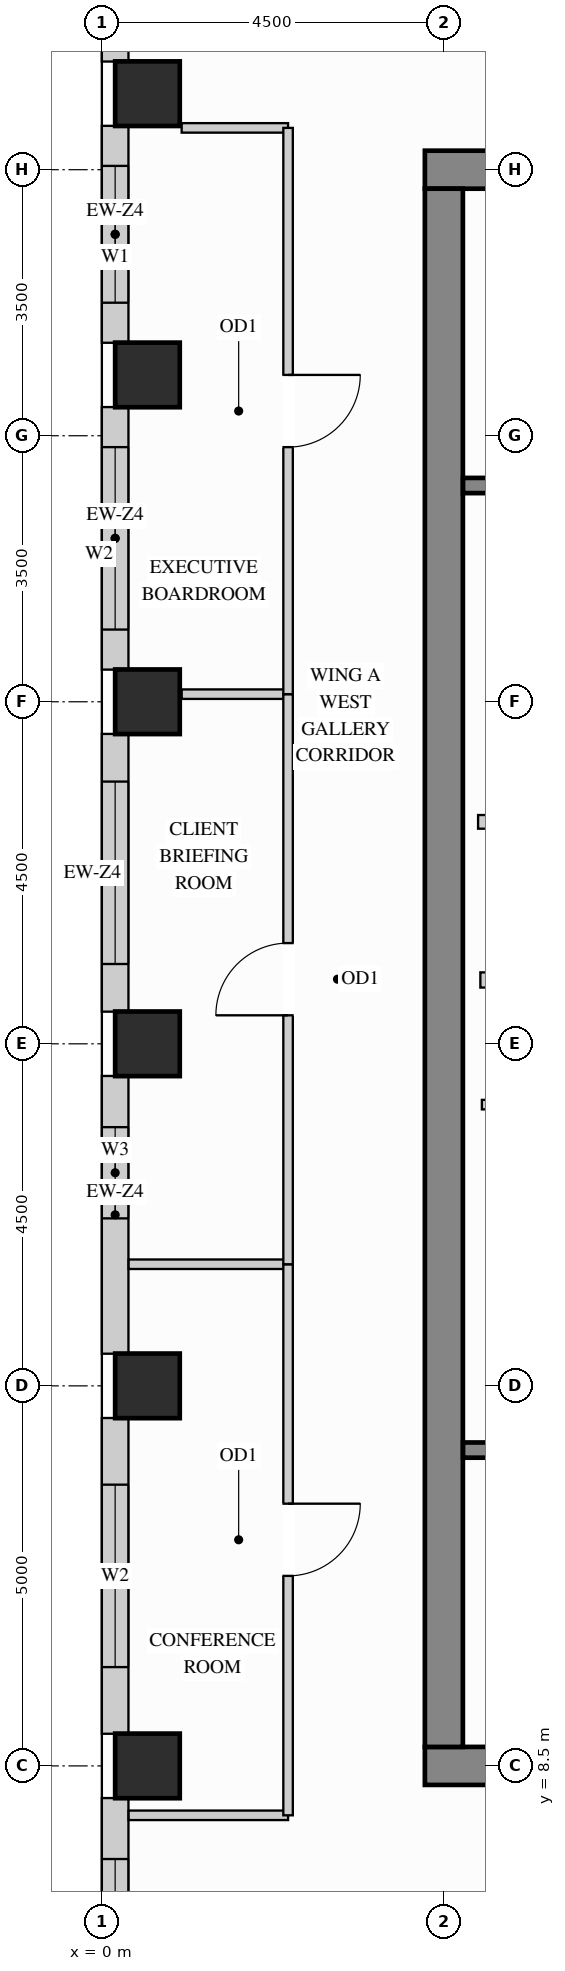
"""IFC4 building model, lengths in metres.
Left out: names, types, materials, properties, quantities, classifications, styles, units other than length and angle.
Written with IfcOpenShell. Run it as: python <this file> out.ifc"""

import sys

from ifc_helpers import new_model, si_unit, direction, frame, frame_2d, origin, origin_2d, place, context, subcontext, project, spatial, rectangle, extrude, source, transform, mapped, element, fill, save


model = new_model("IFC4")
c1 = context("Model", 3, precision=1e-05, world=origin(), true_north=direction((0.0, 1.0)))
c2 = subcontext(c1, "Body", "Model", "MODEL_VIEW")
j1 = project(units=[si_unit("LENGTHUNIT", "METRE"), si_unit("PLANEANGLEUNIT", "RADIAN")], contexts=[c1])
p1 = place(None, origin())
s1 = spatial("IfcSite", under=j1, at=p1, CompositionType="ELEMENT")
p2 = place(p1, origin())
s2 = spatial("IfcBuilding", under=s1, at=p2, CompositionType="ELEMENT")
p3 = place(p2, frame((0.0, 0.0, 216.0)))
s3 = spatial("IfcBuildingStorey", under=s2, at=p3, CompositionType="ELEMENT", Elevation=216.0)
m1 = source(origin(), c2, "Body", "SweptSolid", [
    extrude(rectangle(XDim=0.85, YDim=0.85, at=origin_2d()), origin(), (0.0, 0.0, 1.0), 3.4),
])
for number, where, z_axis, x_axis in (
    (1, (0.6, 13.5, 0.0), (0.0, 0.0, 1.0), (1.0, 0.0, 0.0)),
    (2, (0.6, 18.0, 0.0), (0.0, 0.0, 1.0), (1.0, 0.0, 0.0)),
    (3, (0.6, 22.5, 0.0), (0.0, 0.0, 1.0), (1.0, 0.0, 0.0)),
    (4, (0.6, 26.8, 0.0), (0.0, 0.0, 1.0), (1.0, 0.0, 0.0)),
    (5, (0.6, 30.5, 0.0), (0.0, 0.0, 1.0), (1.0, 0.0, 0.0)),
    (6, (0.6, 8.5, 0.0), (0.0, 0.0, 1.0), (1.0, 0.0, 0.0)),
):
    element("IfcColumn", number, at=place(p3, frame(where, z_axis=z_axis, x_axis=x_axis)), inside=s3, PredefinedType="COLUMN", context=c2, shape_type="MappedRepresentation", body=[
        mapped(m1, transform((0.0, 0.0, 0.0), x_axis=(1.0, 0.0, 0.0), y_axis=(0.0, 1.0, 0.0), z_axis=(0.0, 0.0, 1.0))),
    ])
m2 = source(origin(), c2, "Body", "SweptSolid", [
    extrude(rectangle(XDim=10.5, YDim=0.5, at=frame_2d((5.25, 0.0))), origin(), (0.0, 0.0, 1.0), 3.4),
])
for number, where, z_axis, x_axis in (
    (7, (4.25, 29.5, 0.0), (0.0, 0.0, 1.0), (1.0, 0.0, 0.0)),
    (8, (4.25, 8.5, 0.0), (0.0, 0.0, 1.0), (1.0, 0.0, 0.0)),
):
    element("IfcWall", number, at=place(p3, frame(where, z_axis=z_axis, x_axis=x_axis)), inside=s3, PredefinedType="SHEAR", context=c2, shape_type="MappedRepresentation", body=[
        mapped(m2, transform((0.0, 0.0, 0.0), x_axis=(1.0, 0.0, 0.0), y_axis=(0.0, 1.0, 0.0), z_axis=(0.0, 0.0, 1.0))),
    ])
m3 = source(origin(), c2, "Body", "SweptSolid", [
    extrude(rectangle(XDim=20.5, YDim=0.5, at=frame_2d((10.25, 0.0))), origin(), (0.0, 0.0, 1.0), 3.4),
])
p4 = place(p3, frame((4.5, 8.75, 0.0), z_axis=(0.0, 0.0, 1.0), x_axis=(0.0, 1.0, 0.0)))
e9 = element("IfcWall", 9, at=p4, inside=s3, PredefinedType="SHEAR", context=c2, shape_type="MappedRepresentation", body=[
    mapped(m3, transform((0.0, 0.0, 0.0), x_axis=(1.0, 0.0, 0.0), y_axis=(0.0, 1.0, 0.0), z_axis=(0.0, 0.0, 1.0))),
])
p5 = place(p3, frame((0.175, 34.577, 0.0), z_axis=(0.0, 0.0, 1.0), x_axis=(0.0, -1.0, 0.0)))
e10 = element("IfcWall", 10, at=p5, inside=s3, PredefinedType="SOLIDWALL", context=c2, shape_type="SweptSolid", body=[
    extrude(rectangle(XDim=3.654, YDim=0.35, at=frame_2d((1.827, 0.0))), origin(), (0.0, 0.0, 1.0), 3.385),
])
p6 = place(p5, frame((0.598, 0.0, 0.78)))
e11 = element("IfcOpeningElement", 11, at=p6, cuts=e10, PredefinedType="OPENING", context=c2, shape_type="SweptSolid", body=[
    extrude(rectangle(XDim=1.2, YDim=2.1, at=frame_2d((0.6, 1.05))), frame((0.0, 0.185, 0.0), z_axis=(0.0, -1.0, 0.0), x_axis=(1.0, 0.0, 0.0)), (0.0, 0.0, 1.0), 0.37),
])
p7 = place(p3, frame((0.175, 30.077, 0.0), z_axis=(0.0, 0.0, 1.0), x_axis=(0.0, -1.0, 0.0)))
e12 = element("IfcWall", 12, at=p7, inside=s3, PredefinedType="SOLIDWALL", context=c2, shape_type="SweptSolid", body=[
    extrude(rectangle(XDim=2.854, YDim=0.35, at=frame_2d((1.427, 0.0))), origin(), (0.0, 0.0, 1.0), 3.385),
])
p8 = place(p7, frame((0.527, 0.0, 0.78)))
e13 = element("IfcOpeningElement", 13, at=p8, cuts=e12, PredefinedType="OPENING", context=c2, shape_type="SweptSolid", body=[
    extrude(rectangle(XDim=1.8, YDim=2.1, at=frame_2d((0.9, 1.05))), frame((0.0, 0.185, 0.0), z_axis=(0.0, -1.0, 0.0), x_axis=(1.0, 0.0, 0.0)), (0.0, 0.0, 1.0), 0.37),
])
p9 = place(p3, frame((0.175, 26.377, 0.0), z_axis=(0.0, 0.0, 1.0), x_axis=(0.0, -1.0, 0.0)))
e14 = element("IfcWall", 14, at=p9, inside=s3, PredefinedType="SOLIDWALL", context=c2, shape_type="SweptSolid", body=[
    extrude(rectangle(XDim=3.454, YDim=0.35, at=frame_2d((1.727, 0.0))), origin(), (0.0, 0.0, 1.0), 3.385),
])
p10 = place(p9, frame((0.527, 0.0, 0.78)))
e15 = element("IfcOpeningElement", 15, at=p10, cuts=e14, PredefinedType="OPENING", context=c2, shape_type="SweptSolid", body=[
    extrude(rectangle(XDim=2.4, YDim=2.1, at=frame_2d((1.2, 1.05))), frame((0.0, 0.185, 0.0), z_axis=(0.0, -1.0, 0.0), x_axis=(1.0, 0.0, 0.0)), (0.0, 0.0, 1.0), 0.37),
])
p11 = place(p3, frame((0.175, 22.077, 0.0), z_axis=(0.0, 0.0, 1.0), x_axis=(0.0, -1.0, 0.0)))
e16 = element("IfcWall", 16, at=p11, inside=s3, PredefinedType="SOLIDWALL", context=c2, shape_type="SweptSolid", body=[
    extrude(rectangle(XDim=3.654, YDim=0.35, at=frame_2d((1.827, 0.0))), origin(), (0.0, 0.0, 1.0), 3.385),
])
p12 = place(p11, frame((0.627, 0.0, 0.78)))
e17 = element("IfcOpeningElement", 17, at=p12, cuts=e16, PredefinedType="OPENING", context=c2, shape_type="SweptSolid", body=[
    extrude(rectangle(XDim=2.4, YDim=2.1, at=frame_2d((1.2, 1.05))), frame((0.0, 0.185, 0.0), z_axis=(0.0, -1.0, 0.0), x_axis=(1.0, 0.0, 0.0)), (0.0, 0.0, 1.0), 0.37),
])
p13 = place(p3, frame((0.175, 17.577, 0.0), z_axis=(0.0, 0.0, 1.0), x_axis=(0.0, -1.0, 0.0)))
e18 = element("IfcWall", 18, at=p13, inside=s3, PredefinedType="SOLIDWALL", context=c2, shape_type="SweptSolid", body=[
    extrude(rectangle(XDim=3.654, YDim=0.35, at=frame_2d((1.827, 0.0))), origin(), (0.0, 0.0, 1.0), 3.385),
])
p14 = place(p13, frame((0.674, 0.0, 0.78)))
e19 = element("IfcOpeningElement", 19, at=p14, cuts=e18, PredefinedType="OPENING", context=c2, shape_type="SweptSolid", body=[
    extrude(rectangle(XDim=1.2, YDim=2.1, at=frame_2d((0.6, 1.05))), frame((0.0, 0.185, 0.0), z_axis=(0.0, -1.0, 0.0), x_axis=(1.0, 0.0, 0.0)), (0.0, 0.0, 1.0), 0.37),
])
p15 = place(p3, frame((0.175, 13.077, 0.0), z_axis=(0.0, 0.0, 1.0), x_axis=(0.0, -1.0, 0.0)))
e20 = element("IfcWall", 20, at=p15, inside=s3, PredefinedType="SOLIDWALL", context=c2, shape_type="SweptSolid", body=[
    extrude(rectangle(XDim=4.154, YDim=0.35, at=frame_2d((2.077, 0.0))), origin(), (0.0, 0.0, 1.0), 3.385),
])
p16 = place(p15, frame((0.877, 0.0, 0.78)))
e21 = element("IfcOpeningElement", 21, at=p16, cuts=e20, PredefinedType="OPENING", context=c2, shape_type="SweptSolid", body=[
    extrude(rectangle(XDim=2.4, YDim=2.1, at=frame_2d((1.2, 1.05))), frame((0.0, 0.185, 0.0), z_axis=(0.0, -1.0, 0.0), x_axis=(1.0, 0.0, 0.0)), (0.0, 0.0, 1.0), 0.37),
])
p17 = place(p3, frame((0.175, 8.077, 0.0), z_axis=(0.0, 0.0, 1.0), x_axis=(0.0, -1.0, 0.0)))
e22 = element("IfcWall", 22, at=p17, inside=s3, PredefinedType="SOLIDWALL", context=c2, shape_type="SweptSolid", body=[
    extrude(rectangle(XDim=4.154, YDim=0.35, at=frame_2d((2.077, 0.0))), origin(), (0.0, 0.0, 1.0), 3.385),
])
p18 = place(p17, frame((0.802, 0.0, 0.78)))
e23 = element("IfcOpeningElement", 23, at=p18, cuts=e22, PredefinedType="OPENING", context=c2, shape_type="SweptSolid", body=[
    extrude(rectangle(XDim=1.2, YDim=2.1, at=frame_2d((0.6, 1.05))), frame((0.0, 0.185, 0.0), z_axis=(0.0, -1.0, 0.0), x_axis=(1.0, 0.0, 0.0)), (0.0, 0.0, 1.0), 0.37),
])
m4 = source(origin(), c2, "Body", "SweptSolid", [
    extrude(rectangle(XDim=2.2, YDim=0.18, at=frame_2d((1.1, 0.0))), origin(), (0.0, 0.0, 1.0), 3.385),
])
p19 = place(p3, frame((4.95, 20.92, 0.0), z_axis=(0.0, 0.0, 1.0), x_axis=(1.0, 0.0, 0.0)))
e24 = element("IfcWall", 24, at=p19, inside=s3, PredefinedType="PARTITIONING", context=c2, shape_type="MappedRepresentation", body=[
    mapped(m4, transform((0.0, 0.0, 0.0), x_axis=(1.0, 0.0, 0.0), y_axis=(0.0, 1.0, 0.0), z_axis=(0.0, 0.0, 1.0))),
])
p20 = place(p3, frame((5.0, 17.2, 0.0), z_axis=(0.0, 0.0, 1.0), x_axis=(1.0, 0.0, 0.0)))
e25 = element("IfcWall", 25, at=p20, inside=s3, PredefinedType="PARTITIONING", context=c2, shape_type="SweptSolid", body=[
    extrude(rectangle(XDim=2.4, YDim=0.125, at=frame_2d((1.2, 0.0))), origin(), (0.0, 0.0, 1.0), 3.385),
])
p21 = place(p20, frame((0.7, 0.0, 0.0)))
e26 = element("IfcOpeningElement", 26, at=p21, cuts=e25, PredefinedType="OPENING", context=c2, shape_type="SweptSolid", body=[
    extrude(rectangle(XDim=0.85, YDim=2.1, at=frame_2d((0.425, 1.05))), frame((0.0, 0.073, 0.0), z_axis=(0.0, -1.0, 0.0), x_axis=(1.0, 0.0, 0.0)), (0.0, 0.0, 1.0), 0.145),
])
m5 = source(origin(), c2, "Body", "SweptSolid", [
    extrude(rectangle(XDim=1.4, YDim=0.125, at=frame_2d((0.7, 0.0))), origin(), (0.0, 0.0, 1.0), 3.385),
])
p22 = place(p3, frame((1.05, 30.05, 0.0), z_axis=(0.0, 0.0, 1.0), x_axis=(1.0, 0.0, 0.0)))
e27 = element("IfcWall", 27, at=p22, inside=s3, PredefinedType="PARTITIONING", context=c2, shape_type="MappedRepresentation", body=[
    mapped(m5, transform((0.0, 0.0, 0.0), x_axis=(1.0, 0.0, 0.0), y_axis=(0.0, 1.0, 0.0), z_axis=(0.0, 0.0, 1.0))),
])
m6 = source(origin(), c2, "Body", "SweptSolid", [
    extrude(rectangle(XDim=2.098, YDim=0.125, at=frame_2d((1.049, 0.0))), origin(), (0.0, 0.0, 1.0), 3.385),
])
for number, where, z_axis, x_axis in (
    (28, (0.352, 7.85, 0.0), (0.0, 0.0, 1.0), (1.0, 0.0, 0.0)),
    (29, (0.352, 15.1, 0.0), (0.0, 0.0, 1.0), (1.0, 0.0, 0.0)),
):
    element("IfcWall", number, at=place(p3, frame(where, z_axis=z_axis, x_axis=x_axis)), inside=s3, PredefinedType="PARTITIONING", context=c2, shape_type="MappedRepresentation", body=[
        mapped(m6, transform((0.0, 0.0, 0.0), x_axis=(1.0, 0.0, 0.0), y_axis=(0.0, 1.0, 0.0), z_axis=(0.0, 0.0, 1.0))),
    ])
p23 = place(p3, frame((1.05, 22.6, 0.0), z_axis=(0.0, 0.0, 1.0), x_axis=(1.0, 0.0, 0.0)))
e30 = element("IfcWall", 30, at=p23, inside=s3, PredefinedType="PARTITIONING", context=c2, shape_type="MappedRepresentation", body=[
    mapped(m5, transform((0.0, 0.0, 0.0), x_axis=(1.0, 0.0, 0.0), y_axis=(0.0, 1.0, 0.0), z_axis=(0.0, 0.0, 1.0))),
])
p24 = place(p3, frame((2.45, 7.85, 0.0), z_axis=(0.0, 0.0, 1.0), x_axis=(0.0, 1.0, 0.0)))
e31 = element("IfcWall", 31, at=p24, inside=s3, PredefinedType="PARTITIONING", context=c2, shape_type="SweptSolid", body=[
    extrude(rectangle(XDim=7.25, YDim=0.125, at=frame_2d((3.625, 0.0))), origin(), (0.0, 0.0, 1.0), 3.385),
])
p25 = place(p24, frame((3.15, 0.0, 0.0)))
e32 = element("IfcOpeningElement", 32, at=p25, cuts=e31, PredefinedType="OPENING", context=c2, shape_type="SweptSolid", body=[
    extrude(rectangle(XDim=0.95, YDim=2.15, at=frame_2d((0.475, 1.075))), frame((0.0, 0.073, 0.0), z_axis=(0.0, -1.0, 0.0), x_axis=(1.0, 0.0, 0.0)), (0.0, 0.0, 1.0), 0.145),
])
p26 = place(p3, frame((2.45, 15.1, 0.0), z_axis=(0.0, 0.0, 1.0), x_axis=(0.0, 1.0, 0.0)))
e33 = element("IfcWall", 33, at=p26, inside=s3, PredefinedType="PARTITIONING", context=c2, shape_type="SweptSolid", body=[
    extrude(rectangle(XDim=7.5, YDim=0.125, at=frame_2d((3.75, 0.0))), origin(), (0.0, 0.0, 1.0), 3.385),
])
p27 = place(p26, frame((3.275, 0.0, 0.0)))
e34 = element("IfcOpeningElement", 34, at=p27, cuts=e33, PredefinedType="OPENING", context=c2, shape_type="SweptSolid", body=[
    extrude(rectangle(XDim=0.95, YDim=2.15, at=frame_2d((0.475, 1.075))), frame((0.0, 0.073, 0.0), z_axis=(0.0, -1.0, 0.0), x_axis=(1.0, 0.0, 0.0)), (0.0, 0.0, 1.0), 0.145),
])
p28 = place(p3, frame((2.45, 22.6, 0.0), z_axis=(0.0, 0.0, 1.0), x_axis=(0.0, 1.0, 0.0)))
e35 = element("IfcWall", 35, at=p28, inside=s3, PredefinedType="PARTITIONING", context=c2, shape_type="SweptSolid", body=[
    extrude(rectangle(XDim=7.45, YDim=0.125, at=frame_2d((3.725, 0.0))), origin(), (0.0, 0.0, 1.0), 3.385),
])
p29 = place(p28, frame((3.25, 0.0, 0.0)))
e36 = element("IfcOpeningElement", 36, at=p29, cuts=e35, PredefinedType="OPENING", context=c2, shape_type="SweptSolid", body=[
    extrude(rectangle(XDim=0.95, YDim=2.15, at=frame_2d((0.475, 1.075))), frame((0.0, 0.073, 0.0), z_axis=(0.0, -1.0, 0.0), x_axis=(1.0, 0.0, 0.0)), (0.0, 0.0, 1.0), 0.145),
])
m7 = source(origin(), c2, "Body", "SweptSolid", [
    extrude(rectangle(XDim=2.09, YDim=0.2, at=frame_2d((1.045, 0.0))), origin(), (0.0, 0.0, 1.0), 3.385),
])
p30 = place(p3, frame((4.98, 18.84, 0.0), z_axis=(0.0, 0.0, 1.0), x_axis=(1.0, 0.0, 0.0)))
e37 = element("IfcWall", 37, at=p30, inside=s3, PredefinedType="PARTITIONING", context=c2, shape_type="MappedRepresentation", body=[
    mapped(m7, transform((0.0, 0.0, 0.0), x_axis=(1.0, 0.0, 0.0), y_axis=(0.0, 1.0, 0.0), z_axis=(0.0, 0.0, 1.0))),
])
p31 = place(p3, frame((4.752, 12.655, 0.0), z_axis=(0.0, 0.0, 1.0), x_axis=(1.0, 0.0, 0.0)))
e38 = element("IfcWall", 38, at=p31, inside=s3, PredefinedType="SHEAR", context=c2, shape_type="SweptSolid", body=[
    extrude(rectangle(XDim=7.653, YDim=0.2, at=frame_2d((3.827, 0.0))), origin(), (0.0, 0.0, 1.0), 3.4),
])
p32 = place(p31, frame((0.4, 0.0, 0.0)))
e39 = element("IfcOpeningElement", 39, at=p32, cuts=e38, PredefinedType="OPENING", context=c2, shape_type="SweptSolid", body=[
    extrude(rectangle(XDim=1.1, YDim=2.15, at=frame_2d((0.55, 1.075))), frame((0.0, 0.11, 0.0), z_axis=(0.0, -1.0, 0.0), x_axis=(1.0, 0.0, 0.0)), (0.0, 0.0, 1.0), 0.22),
])
p33 = place(p3, frame((4.752, 25.345, 0.0), z_axis=(0.0, 0.0, 1.0), x_axis=(1.0, 0.0, 0.0)))
e40 = element("IfcWall", 40, at=p33, inside=s3, PredefinedType="SHEAR", context=c2, shape_type="SweptSolid", body=[
    extrude(rectangle(XDim=7.653, YDim=0.2, at=frame_2d((3.827, 0.0))), origin(), (0.0, 0.0, 1.0), 3.4),
])
p34 = place(p33, frame((0.4, 0.0, 0.0)))
e41 = element("IfcOpeningElement", 41, at=p34, cuts=e40, PredefinedType="OPENING", context=c2, shape_type="SweptSolid", body=[
    extrude(rectangle(XDim=1.1, YDim=2.15, at=frame_2d((0.55, 1.075))), frame((0.0, 0.11, 0.0), z_axis=(0.0, -1.0, 0.0), x_axis=(1.0, 0.0, 0.0)), (0.0, 0.0, 1.0), 0.22),
])
m8 = source(origin(), c2, "Body", "SweptSolid", [
    extrude(rectangle(XDim=0.95, YDim=2.15, at=frame_2d((0.475, 1.075))), frame((0.0, 0.025, 0.0), z_axis=(0.0, -1.0, 0.0), x_axis=(1.0, 0.0, 0.0)), (0.0, 0.0, 1.0), 0.05),
])
p35 = place(p25, origin())
e42 = element("IfcDoor", 42, at=p35, inside=s3, OperationType="SINGLE_SWING_RIGHT", PredefinedType="DOOR", context=c2, shape_type="MappedRepresentation", body=[
    mapped(m8, transform((0.0, 0.0, 0.0), x_axis=(1.0, 0.0, 0.0), y_axis=(0.0, 1.0, 0.0), z_axis=(0.0, 0.0, 1.0))),
])
fill(e32, e42)
p36 = place(p27, origin())
e43 = element("IfcDoor", 43, at=p36, inside=s3, OperationType="SINGLE_SWING_LEFT", PredefinedType="DOOR", context=c2, shape_type="MappedRepresentation", body=[
    mapped(m8, transform((0.0, 0.0, 0.0), x_axis=(1.0, 0.0, 0.0), y_axis=(0.0, 1.0, 0.0), z_axis=(0.0, 0.0, 1.0))),
])
fill(e34, e43)
p37 = place(p29, origin())
e44 = element("IfcDoor", 44, at=p37, inside=s3, OperationType="SINGLE_SWING_RIGHT", PredefinedType="DOOR", context=c2, shape_type="MappedRepresentation", body=[
    mapped(m8, transform((0.0, 0.0, 0.0), x_axis=(1.0, 0.0, 0.0), y_axis=(0.0, 1.0, 0.0), z_axis=(0.0, 0.0, 1.0))),
])
fill(e36, e44)
m9 = source(origin(), c2, "Body", "SweptSolid", [
    extrude(rectangle(XDim=1.8, YDim=2.1, at=frame_2d((0.9, 1.05))), frame((0.0, 0.03, 0.0), z_axis=(0.0, -1.0, 0.0), x_axis=(1.0, 0.0, 0.0)), (0.0, 0.0, 1.0), 0.06),
])
p38 = place(p8, origin())
e45 = element("IfcWindow", 45, at=p38, inside=s3, PartitioningType="SINGLE_PANEL", PredefinedType="WINDOW", context=c2, shape_type="MappedRepresentation", body=[
    mapped(m9, transform((0.0, 0.0, 0.0), x_axis=(1.0, 0.0, 0.0), y_axis=(0.0, 1.0, 0.0), z_axis=(0.0, 0.0, 1.0))),
])
fill(e13, e45)
m10 = source(origin(), c2, "Body", "SweptSolid", [
    extrude(rectangle(XDim=2.4, YDim=2.1, at=frame_2d((1.2, 1.05))), frame((0.0, 0.03, 0.0), z_axis=(0.0, -1.0, 0.0), x_axis=(1.0, 0.0, 0.0)), (0.0, 0.0, 1.0), 0.06),
])
p39 = place(p10, origin())
e46 = element("IfcWindow", 46, at=p39, inside=s3, PartitioningType="SINGLE_PANEL", PredefinedType="WINDOW", context=c2, shape_type="MappedRepresentation", body=[
    mapped(m10, transform((0.0, 0.0, 0.0), x_axis=(1.0, 0.0, 0.0), y_axis=(0.0, 1.0, 0.0), z_axis=(0.0, 0.0, 1.0))),
])
fill(e15, e46)
p40 = place(p12, origin())
e47 = element("IfcWindow", 47, at=p40, inside=s3, PartitioningType="SINGLE_PANEL", PredefinedType="WINDOW", context=c2, shape_type="MappedRepresentation", body=[
    mapped(m10, transform((0.0, 0.0, 0.0), x_axis=(1.0, 0.0, 0.0), y_axis=(0.0, 1.0, 0.0), z_axis=(0.0, 0.0, 1.0))),
])
fill(e17, e47)
p41 = place(p16, origin())
e48 = element("IfcWindow", 48, at=p41, inside=s3, PartitioningType="SINGLE_PANEL", PredefinedType="WINDOW", context=c2, shape_type="MappedRepresentation", body=[
    mapped(m10, transform((0.0, 0.0, 0.0), x_axis=(1.0, 0.0, 0.0), y_axis=(0.0, 1.0, 0.0), z_axis=(0.0, 0.0, 1.0))),
])
fill(e21, e48)
m11 = source(origin(), c2, "Body", "SweptSolid", [
    extrude(rectangle(XDim=1.2, YDim=2.1, at=frame_2d((0.6, 1.05))), frame((0.0, 0.03, 0.0), z_axis=(0.0, -1.0, 0.0), x_axis=(1.0, 0.0, 0.0)), (0.0, 0.0, 1.0), 0.06),
])
p42 = place(p14, origin())
e49 = element("IfcWindow", 49, at=p42, inside=s3, PartitioningType="SINGLE_PANEL", PredefinedType="WINDOW", context=c2, shape_type="MappedRepresentation", body=[
    mapped(m11, transform((0.0, 0.0, 0.0), x_axis=(1.0, 0.0, 0.0), y_axis=(0.0, 1.0, 0.0), z_axis=(0.0, 0.0, 1.0))),
])
fill(e19, e49)
p43 = place(p18, origin())
e50 = element("IfcWindow", 50, at=p43, inside=s3, PartitioningType="SINGLE_PANEL", PredefinedType="WINDOW", context=c2, shape_type="MappedRepresentation", body=[
    mapped(m11, transform((0.0, 0.0, 0.0), x_axis=(1.0, 0.0, 0.0), y_axis=(0.0, 1.0, 0.0), z_axis=(0.0, 0.0, 1.0))),
])
fill(e23, e50)
save(model, sys.argv[1])
